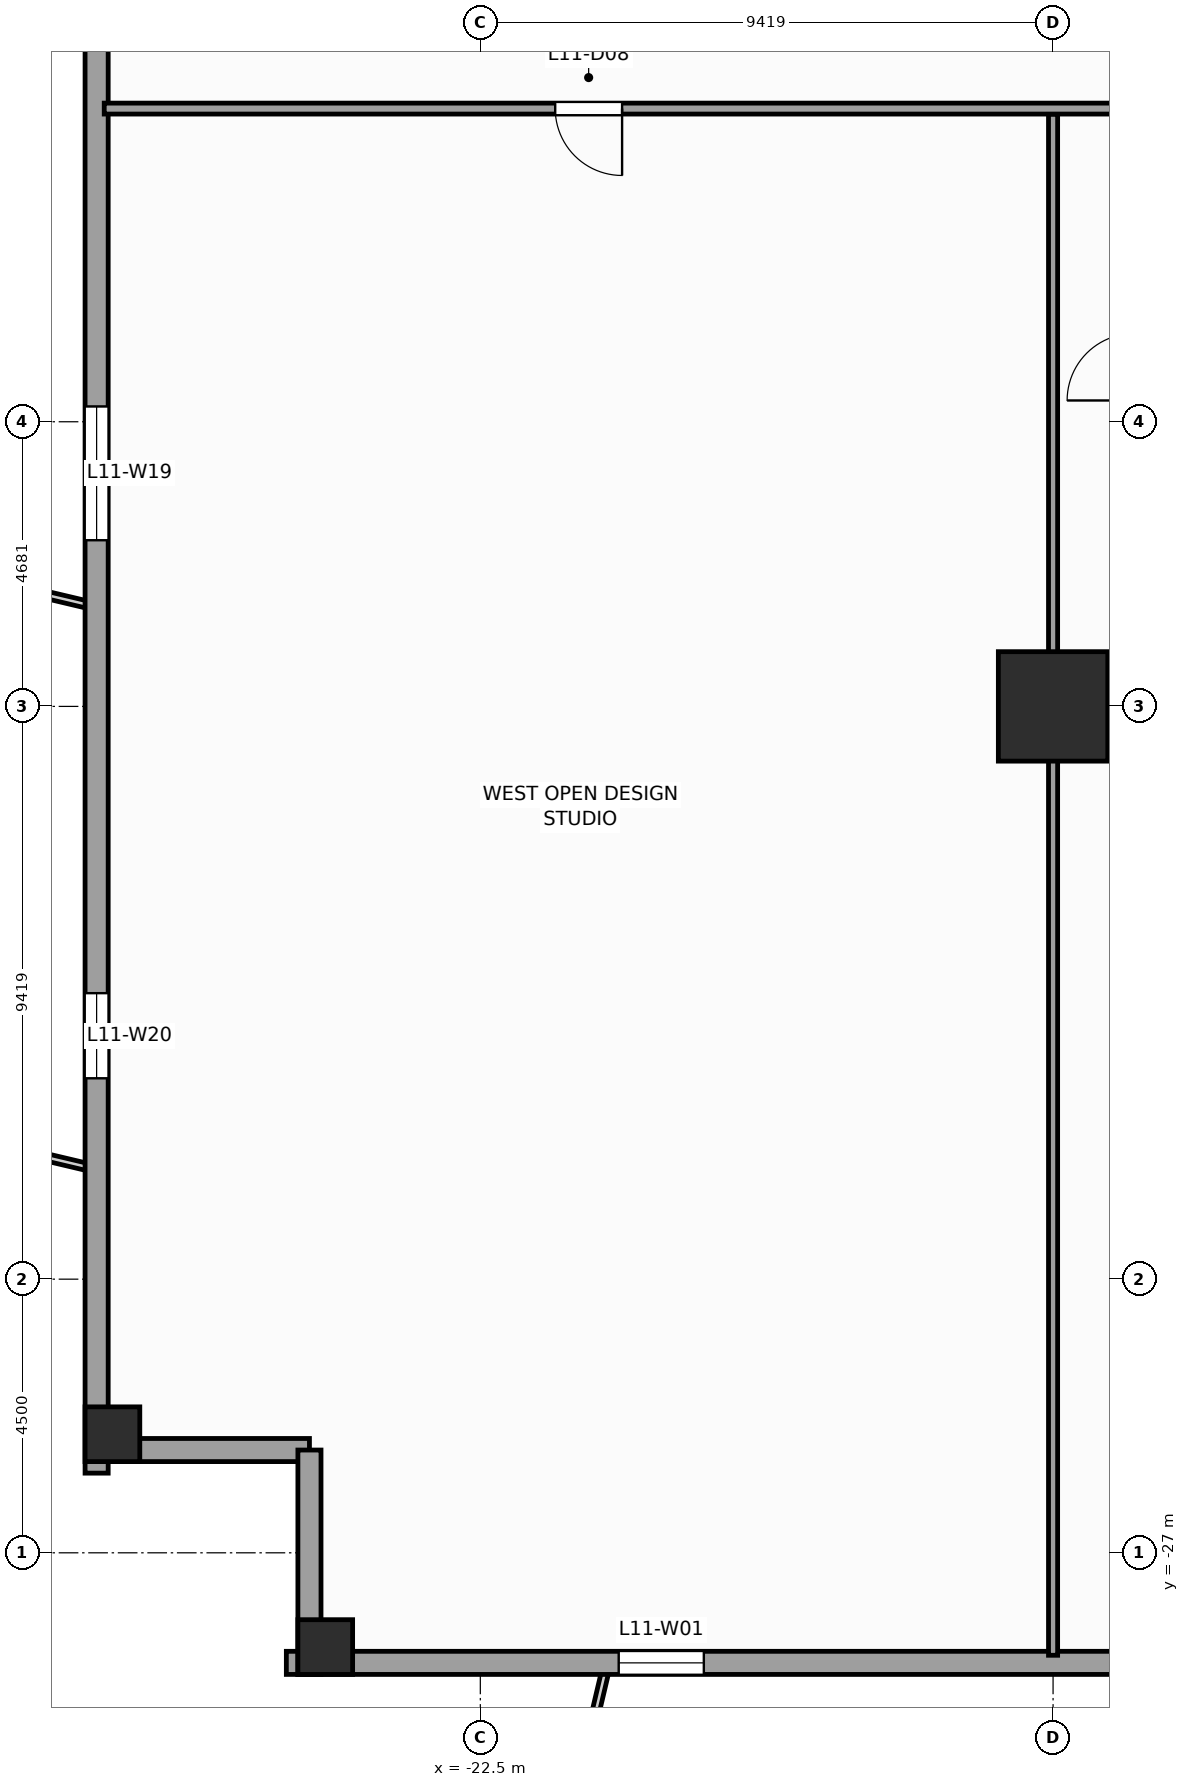
"""IFC4 building model, lengths in metres.
Left out: names, types, materials, properties, quantities, classifications, styles, units other than length and angle.
Written with IfcOpenShell. Run it as: python <this file> out.ifc"""

import sys

from ifc_helpers import new_model, si_unit, direction, frame, frame_2d, origin, origin_2d, place, context, subcontext, project, spatial, rectangle, extrude, source, transform, mapped, element, fill, save


model = new_model("IFC4")
c1 = context("Model", 3, precision=1e-05, world=origin(), true_north=direction((0.0, 1.0)))
c2 = subcontext(c1, "Body", "Model", "MODEL_VIEW")
j1 = project(units=[si_unit("LENGTHUNIT", "METRE"), si_unit("PLANEANGLEUNIT", "RADIAN")], contexts=[c1])
p1 = place(None, origin())
s1 = spatial("IfcSite", under=j1, at=p1, CompositionType="ELEMENT")
p2 = place(p1, origin())
s2 = spatial("IfcBuilding", under=s1, at=p2, CompositionType="ELEMENT")
p3 = place(p2, frame((0.0, 0.0, 50.0)))
s3 = spatial("IfcBuildingStorey", under=s2, at=p3, CompositionType="ELEMENT", Elevation=50.0)
m1 = source(origin(), c2, "Body", "SweptSolid", [
    extrude(rectangle(XDim=1.8, YDim=1.8, at=origin_2d()), origin(), (0.0, 0.0, 1.0), 4.0),
])
p4 = place(p3, frame((-13.081, -13.081, 0.0), z_axis=(0.0, 0.0, 1.0), x_axis=(1.0, 0.0, 0.0)))
e1 = element("IfcColumn", 1, at=p4, inside=s3, PredefinedType="COLUMN", context=c2, shape_type="MappedRepresentation", body=[
    mapped(m1, transform((0.0, 0.0, 0.0), scale=1.0)),
])
m2 = source(origin(), c2, "Body", "SweptSolid", [
    extrude(rectangle(XDim=0.9, YDim=0.9, at=origin_2d()), origin(), (0.0, 0.0, 1.0), 4.0),
])
for number, where, z_axis, x_axis in (
    (2, (-25.05, -28.55, 0.0), (0.0, 0.0, 1.0), (1.0, 0.0, 0.0)),
    (3, (-28.55, -25.05, 0.0), (0.0, 0.0, 1.0), (1.0, 0.0, 0.0)),
):
    element("IfcColumn", number, at=place(p3, frame(where, z_axis=z_axis, x_axis=x_axis)), inside=s3, PredefinedType="COLUMN", context=c2, shape_type="MappedRepresentation", body=[
        mapped(m2, transform((0.0, 0.0, 0.0), scale=1.0)),
    ])
p5 = place(p3, frame((-25.69, -28.81, 0.0), z_axis=(0.0, 0.0, 1.0), x_axis=(1.0, 0.0, 0.0)))
e4 = element("IfcWall", 4, at=p5, inside=s3, PredefinedType="STANDARD", context=c2, shape_type="SweptSolid", body=[
    extrude(rectangle(XDim=51.38, YDim=0.38, at=frame_2d((25.69, 0.0))), origin(), (0.0, 0.0, 1.0), 3.12),
])
p6 = place(p5, frame((29.915, 0.0, 0.0)))
e5 = element("IfcOpeningElement", 5, at=p6, cuts=e4, PredefinedType="OPENING", context=c2, shape_type="SweptSolid", body=[
    extrude(rectangle(XDim=1.05, YDim=2.25, at=frame_2d((0.525, 1.125))), frame((0.0, 0.2, 0.0), z_axis=(0.0, -1.0, 0.0), x_axis=(1.0, 0.0, 0.0)), (0.0, 0.0, 1.0), 0.4),
])
p7 = place(p5, frame((5.466, 0.0, 0.49)))
e6 = element("IfcOpeningElement", 6, at=p7, cuts=e4, PredefinedType="OPENING", context=c2, shape_type="SweptSolid", body=[
    extrude(rectangle(XDim=1.4, YDim=2.4, at=frame_2d((0.7, 1.2))), frame((0.0, 0.2, 0.0), z_axis=(0.0, -1.0, 0.0), x_axis=(1.0, 0.0, 0.0)), (0.0, 0.0, 1.0), 0.4),
])
p8 = place(p5, frame((13.8, 0.0, 0.49)))
e7 = element("IfcOpeningElement", 7, at=p8, cuts=e4, PredefinedType="OPENING", context=c2, shape_type="SweptSolid", body=[
    extrude(rectangle(XDim=2.2, YDim=2.4, at=frame_2d((1.1, 1.2))), frame((0.0, 0.2, 0.0), z_axis=(0.0, -1.0, 0.0), x_axis=(1.0, 0.0, 0.0)), (0.0, 0.0, 1.0), 0.4),
])
p9 = place(p5, frame((22.062, 0.0, 0.49)))
e8 = element("IfcOpeningElement", 8, at=p9, cuts=e4, PredefinedType="OPENING", context=c2, shape_type="SweptSolid", body=[
    extrude(rectangle(XDim=2.2, YDim=2.4, at=frame_2d((1.1, 1.2))), frame((0.0, 0.2, 0.0), z_axis=(0.0, -1.0, 0.0), x_axis=(1.0, 0.0, 0.0)), (0.0, 0.0, 1.0), 0.4),
])
p10 = place(p5, frame((33.838, 0.0, 0.49)))
e9 = element("IfcOpeningElement", 9, at=p10, cuts=e4, PredefinedType="OPENING", context=c2, shape_type="SweptSolid", body=[
    extrude(rectangle(XDim=2.2, YDim=2.4, at=frame_2d((1.1, 1.2))), frame((0.0, 0.2, 0.0), z_axis=(0.0, -1.0, 0.0), x_axis=(1.0, 0.0, 0.0)), (0.0, 0.0, 1.0), 0.4),
])
p11 = place(p5, frame((43.487, 0.0, 0.49)))
e10 = element("IfcOpeningElement", 10, at=p11, cuts=e4, PredefinedType="OPENING", context=c2, shape_type="SweptSolid", body=[
    extrude(rectangle(XDim=1.4, YDim=2.4, at=frame_2d((0.7, 1.2))), frame((0.0, 0.2, 0.0), z_axis=(0.0, -1.0, 0.0), x_axis=(1.0, 0.0, 0.0)), (0.0, 0.0, 1.0), 0.4),
])
p12 = place(p3, frame((-28.81, 25.69, 0.0), z_axis=(0.0, 0.0, 1.0), x_axis=(0.0, -1.0, 0.0)))
e11 = element("IfcWall", 11, at=p12, inside=s3, PredefinedType="STANDARD", context=c2, shape_type="SweptSolid", body=[
    extrude(rectangle(XDim=51.38, YDim=0.38, at=frame_2d((25.69, 0.0))), origin(), (0.0, 0.0, 1.0), 3.12),
])
p13 = place(p12, frame((5.466, 0.0, 0.49)))
e12 = element("IfcOpeningElement", 12, at=p13, cuts=e11, PredefinedType="OPENING", context=c2, shape_type="SweptSolid", body=[
    extrude(rectangle(XDim=1.4, YDim=2.4, at=frame_2d((0.7, 1.2))), frame((0.0, 0.2, 0.0), z_axis=(0.0, -1.0, 0.0), x_axis=(1.0, 0.0, 0.0)), (0.0, 0.0, 1.0), 0.4),
])
p14 = place(p12, frame((13.8, 0.0, 0.49)))
e13 = element("IfcOpeningElement", 13, at=p14, cuts=e11, PredefinedType="OPENING", context=c2, shape_type="SweptSolid", body=[
    extrude(rectangle(XDim=2.2, YDim=2.4, at=frame_2d((1.1, 1.2))), frame((0.0, 0.2, 0.0), z_axis=(0.0, -1.0, 0.0), x_axis=(1.0, 0.0, 0.0)), (0.0, 0.0, 1.0), 0.4),
])
p15 = place(p12, frame((22.062, 0.0, 0.49)))
e14 = element("IfcOpeningElement", 14, at=p15, cuts=e11, PredefinedType="OPENING", context=c2, shape_type="SweptSolid", body=[
    extrude(rectangle(XDim=2.2, YDim=2.4, at=frame_2d((1.1, 1.2))), frame((0.0, 0.2, 0.0), z_axis=(0.0, -1.0, 0.0), x_axis=(1.0, 0.0, 0.0)), (0.0, 0.0, 1.0), 0.4),
])
p16 = place(p12, frame((33.838, 0.0, 0.49)))
e15 = element("IfcOpeningElement", 15, at=p16, cuts=e11, PredefinedType="OPENING", context=c2, shape_type="SweptSolid", body=[
    extrude(rectangle(XDim=2.2, YDim=2.4, at=frame_2d((1.1, 1.2))), frame((0.0, 0.2, 0.0), z_axis=(0.0, -1.0, 0.0), x_axis=(1.0, 0.0, 0.0)), (0.0, 0.0, 1.0), 0.4),
])
p17 = place(p12, frame((43.487, 0.0, 0.49)))
e16 = element("IfcOpeningElement", 16, at=p17, cuts=e11, PredefinedType="OPENING", context=c2, shape_type="SweptSolid", body=[
    extrude(rectangle(XDim=1.4, YDim=2.4, at=frame_2d((0.7, 1.2))), frame((0.0, 0.2, 0.0), z_axis=(0.0, -1.0, 0.0), x_axis=(1.0, 0.0, 0.0)), (0.0, 0.0, 1.0), 0.4),
])
p18 = place(p3, frame((-28.81, -25.31, 0.0), z_axis=(0.0, 0.0, 1.0), x_axis=(1.0, 0.0, 0.0)))
e17 = element("IfcWall", 17, at=p18, inside=s3, PredefinedType="STANDARD", context=c2, shape_type="SweptSolid", body=[
    extrude(rectangle(XDim=3.5, YDim=0.38, at=frame_2d((1.75, 0.0))), origin(), (0.0, 0.0, 1.0), 3.72),
])
p19 = place(p3, frame((-25.31, -25.31, 0.0), z_axis=(0.0, 0.0, 1.0), x_axis=(0.0, -1.0, 0.0)))
e18 = element("IfcWall", 18, at=p19, inside=s3, PredefinedType="STANDARD", context=c2, shape_type="SweptSolid", body=[
    extrude(rectangle(XDim=3.69, YDim=0.38, at=frame_2d((1.845, 0.0))), origin(), (0.0, 0.0, 1.0), 3.72),
])
p20 = place(p3, frame((-28.685, -3.25, 0.0), z_axis=(0.0, 0.0, 1.0), x_axis=(1.0, 0.0, 0.0)))
e19 = element("IfcWall", 19, at=p20, inside=s3, PredefinedType="PARTITIONING", context=c2, shape_type="SweptSolid", body=[
    extrude(rectangle(XDim=16.835, YDim=0.18, at=frame_2d((8.417, 0.0))), origin(), (0.0, 0.0, 1.0), 3.72),
])
p21 = place(p20, frame((7.417, 0.0, 0.0)))
e20 = element("IfcOpeningElement", 20, at=p21, cuts=e19, PredefinedType="OPENING", context=c2, shape_type="SweptSolid", body=[
    extrude(rectangle(XDim=1.1, YDim=2.2, at=frame_2d((0.55, 1.1))), frame((0.0, 0.1, 0.0), z_axis=(0.0, -1.0, 0.0), x_axis=(1.0, 0.0, 0.0)), (0.0, 0.0, 1.0), 0.2),
])
p22 = place(p3, frame((-13.081, -28.685, 0.0), z_axis=(0.0, 0.0, 1.0), x_axis=(0.0, 1.0, 0.0)))
e21 = element("IfcWall", 21, at=p22, inside=s3, PredefinedType="PARTITIONING", context=c2, shape_type="SweptSolid", body=[
    extrude(rectangle(XDim=25.34, YDim=0.15, at=frame_2d((12.67, 0.0))), origin(), (0.0, 0.0, 1.0), 2.712),
])
m3 = source(origin(), c2, "Body", "SweptSolid", [
    extrude(rectangle(XDim=1.4, YDim=2.4, at=frame_2d((0.7, 1.2))), frame((0.0, 0.03, 0.0), z_axis=(0.0, -1.0, 0.0), x_axis=(1.0, 0.0, 0.0)), (0.0, 0.0, 1.0), 0.06),
])
p23 = place(p7, origin())
e22 = element("IfcWindow", 22, at=p23, inside=s3, PartitioningType="SINGLE_PANEL", PredefinedType="WINDOW", context=c2, shape_type="MappedRepresentation", body=[
    mapped(m3, transform((0.0, 0.0, 0.0), scale=1.0)),
])
fill(e6, e22)
m4 = source(origin(), c2, "Body", "SweptSolid", [
    extrude(rectangle(XDim=2.2, YDim=2.4, at=frame_2d((1.1, 1.2))), frame((0.0, 0.03, 0.0), z_axis=(0.0, -1.0, 0.0), x_axis=(1.0, 0.0, 0.0)), (0.0, 0.0, 1.0), 0.06),
])
p24 = place(p16, origin())
e23 = element("IfcWindow", 23, at=p24, inside=s3, PartitioningType="SINGLE_PANEL", PredefinedType="WINDOW", context=c2, shape_type="MappedRepresentation", body=[
    mapped(m4, transform((0.0, 0.0, 0.0), scale=1.0)),
])
fill(e15, e23)
p25 = place(p17, origin())
e24 = element("IfcWindow", 24, at=p25, inside=s3, PartitioningType="SINGLE_PANEL", PredefinedType="WINDOW", context=c2, shape_type="MappedRepresentation", body=[
    mapped(m3, transform((0.0, 0.0, 0.0), scale=1.0)),
])
fill(e16, e24)
m5 = source(origin(), c2, "Body", "SweptSolid", [
    extrude(rectangle(XDim=1.1, YDim=2.2, at=frame_2d((0.55, 1.1))), frame((0.0, 0.025, 0.0), z_axis=(0.0, -1.0, 0.0), x_axis=(1.0, 0.0, 0.0)), (0.0, 0.0, 1.0), 0.05),
])
p26 = place(p21, frame((1.1, 0.0, 0.0), z_axis=(0.0, 0.0, 1.0), x_axis=(-1.0, 0.0, 0.0)))
e25 = element("IfcDoor", 25, at=p26, inside=s3, OperationType="SINGLE_SWING_RIGHT", PredefinedType="DOOR", context=c2, shape_type="MappedRepresentation", body=[
    mapped(m5, transform((0.0, 0.0, 0.0), scale=1.0)),
])
fill(e20, e25)
save(model, sys.argv[1])
